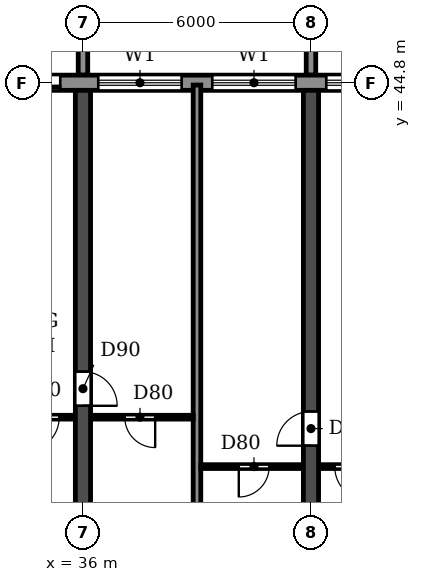
"""IFC4 building model, lengths in metres.
Left out: names, types, materials, properties, quantities, classifications, styles, units other than length and angle.
Written with IfcOpenShell. Run it as: python <this file> out.ifc"""

import sys

from ifc_helpers import new_model, si_unit, direction, frame, frame_2d, origin, place, context, subcontext, project, spatial, polyline, rectangle, outline, extrude, source, transform, mapped, element, fill, save


model = new_model("IFC4")
c1 = context("Model", 3, precision=1e-05, world=origin(), true_north=direction((0.0, 1.0)))
c2 = subcontext(c1, "Body", "Model", "MODEL_VIEW")
j1 = project(units=[si_unit("LENGTHUNIT", "METRE"), si_unit("PLANEANGLEUNIT", "RADIAN")], contexts=[c1])
p1 = place(None, origin())
s1 = spatial("IfcSite", under=j1, at=p1, CompositionType="ELEMENT")
p2 = place(p1, origin())
s2 = spatial("IfcBuilding", under=s1, at=p2, CompositionType="ELEMENT")
p3 = place(p2, frame((0.0, 0.0, 43.2)))
s3 = spatial("IfcBuildingStorey", under=s2, at=p3, CompositionType="ELEMENT", Elevation=43.2)
p4 = place(p3, frame((36.0, 30.55, 0.0), z_axis=(0.0, 0.0, 1.0), x_axis=(0.0, 1.0, 0.0)))
e1 = element("IfcWall", 1, at=p4, inside=s3, PredefinedType="SHEAR", context=c2, shape_type="SweptSolid", body=[
    extrude(rectangle(XDim=14.05, YDim=0.4, at=frame_2d((7.025, 0.0))), origin(), (0.0, 0.0, 1.0), 3.05),
])
p5 = place(p4, frame((5.75, 0.0, 0.0)))
e2 = element("IfcOpeningElement", 2, at=p5, cuts=e1, PredefinedType="OPENING", context=c2, shape_type="SweptSolid", body=[
    extrude(rectangle(XDim=0.9, YDim=2.1, at=frame_2d((0.45, 1.05))), frame((0.0, 0.21, 0.0), z_axis=(0.0, -1.0, 0.0), x_axis=(1.0, 0.0, 0.0)), (0.0, 0.0, 1.0), 0.42),
])
p6 = place(p3, frame((42.0, 30.55, 0.0), z_axis=(0.0, 0.0, 1.0), x_axis=(0.0, 1.0, 0.0)))
e3 = element("IfcWall", 3, at=p6, inside=s3, PredefinedType="SHEAR", context=c2, shape_type="SweptSolid", body=[
    extrude(rectangle(XDim=14.05, YDim=0.4, at=frame_2d((7.025, 0.0))), origin(), (0.0, 0.0, 1.0), 3.05),
])
p7 = place(p6, frame((4.7, 0.0, 0.0)))
e4 = element("IfcOpeningElement", 4, at=p7, cuts=e3, PredefinedType="OPENING", context=c2, shape_type="SweptSolid", body=[
    extrude(rectangle(XDim=0.9, YDim=2.1, at=frame_2d((0.45, 1.05))), frame((0.0, 0.21, 0.0), z_axis=(0.0, -1.0, 0.0), x_axis=(1.0, 0.0, 0.0)), (0.0, 0.0, 1.0), 0.42),
])
p8 = place(p3, frame((97.317, 44.8, 0.0), z_axis=(0.0, 0.0, 1.0), x_axis=(-1.0, 0.0, 0.0)))
e5 = element("IfcWall", 5, at=p8, inside=s3, PredefinedType="STANDARD", context=c2, shape_type="SweptSolid", body=[
    extrude(rectangle(XDim=92.634, YDim=0.4, at=frame_2d((46.317, 0.0))), origin(), (0.0, 0.0, 1.0), 3.05),
])
p9 = place(p8, frame((88.917, 0.0, 0.0)))
e6 = element("IfcOpeningElement", 6, at=p9, cuts=e5, PredefinedType="OPENING", context=c2, shape_type="SweptSolid", body=[
    extrude(rectangle(XDim=1.8, YDim=2.4, at=frame_2d((0.9, 1.2))), frame((0.0, 0.21, 0.0), z_axis=(0.0, -1.0, 0.0), x_axis=(1.0, 0.0, 0.0)), (0.0, 0.0, 1.0), 0.42),
])
p10 = place(p8, frame((85.717, 0.0, 0.9)))
e7 = element("IfcOpeningElement", 7, at=p10, cuts=e5, PredefinedType="OPENING", context=c2, shape_type="SweptSolid", body=[
    extrude(rectangle(XDim=2.2, YDim=1.5, at=frame_2d((1.1, 0.75))), frame((0.0, 0.21, 0.0), z_axis=(0.0, -1.0, 0.0), x_axis=(1.0, 0.0, 0.0)), (0.0, 0.0, 1.0), 0.42),
])
p11 = place(p8, frame((82.717, 0.0, 0.9)))
e8 = element("IfcOpeningElement", 8, at=p11, cuts=e5, PredefinedType="OPENING", context=c2, shape_type="SweptSolid", body=[
    extrude(rectangle(XDim=2.2, YDim=1.5, at=frame_2d((1.1, 0.75))), frame((0.0, 0.21, 0.0), z_axis=(0.0, -1.0, 0.0), x_axis=(1.0, 0.0, 0.0)), (0.0, 0.0, 1.0), 0.42),
])
p12 = place(p8, frame((79.717, 0.0, 0.9)))
e9 = element("IfcOpeningElement", 9, at=p12, cuts=e5, PredefinedType="OPENING", context=c2, shape_type="SweptSolid", body=[
    extrude(rectangle(XDim=2.2, YDim=1.5, at=frame_2d((1.1, 0.75))), frame((0.0, 0.21, 0.0), z_axis=(0.0, -1.0, 0.0), x_axis=(1.0, 0.0, 0.0)), (0.0, 0.0, 1.0), 0.42),
])
p13 = place(p8, frame((76.717, 0.0, 0.9)))
e10 = element("IfcOpeningElement", 10, at=p13, cuts=e5, PredefinedType="OPENING", context=c2, shape_type="SweptSolid", body=[
    extrude(rectangle(XDim=2.2, YDim=1.5, at=frame_2d((1.1, 0.75))), frame((0.0, 0.21, 0.0), z_axis=(0.0, -1.0, 0.0), x_axis=(1.0, 0.0, 0.0)), (0.0, 0.0, 1.0), 0.42),
])
p14 = place(p8, frame((73.917, 0.0, 0.0)))
e11 = element("IfcOpeningElement", 11, at=p14, cuts=e5, PredefinedType="OPENING", context=c2, shape_type="SweptSolid", body=[
    extrude(rectangle(XDim=1.8, YDim=2.4, at=frame_2d((0.9, 1.2))), frame((0.0, 0.21, 0.0), z_axis=(0.0, -1.0, 0.0), x_axis=(1.0, 0.0, 0.0)), (0.0, 0.0, 1.0), 0.42),
])
p15 = place(p8, frame((70.717, 0.0, 0.9)))
e12 = element("IfcOpeningElement", 12, at=p15, cuts=e5, PredefinedType="OPENING", context=c2, shape_type="SweptSolid", body=[
    extrude(rectangle(XDim=2.2, YDim=1.5, at=frame_2d((1.1, 0.75))), frame((0.0, 0.21, 0.0), z_axis=(0.0, -1.0, 0.0), x_axis=(1.0, 0.0, 0.0)), (0.0, 0.0, 1.0), 0.42),
])
p16 = place(p8, frame((67.717, 0.0, 0.9)))
e13 = element("IfcOpeningElement", 13, at=p16, cuts=e5, PredefinedType="OPENING", context=c2, shape_type="SweptSolid", body=[
    extrude(rectangle(XDim=2.2, YDim=1.5, at=frame_2d((1.1, 0.75))), frame((0.0, 0.21, 0.0), z_axis=(0.0, -1.0, 0.0), x_axis=(1.0, 0.0, 0.0)), (0.0, 0.0, 1.0), 0.42),
])
p17 = place(p8, frame((64.717, 0.0, 0.9)))
e14 = element("IfcOpeningElement", 14, at=p17, cuts=e5, PredefinedType="OPENING", context=c2, shape_type="SweptSolid", body=[
    extrude(rectangle(XDim=2.2, YDim=1.5, at=frame_2d((1.1, 0.75))), frame((0.0, 0.21, 0.0), z_axis=(0.0, -1.0, 0.0), x_axis=(1.0, 0.0, 0.0)), (0.0, 0.0, 1.0), 0.42),
])
p18 = place(p8, frame((61.917, 0.0, 0.0)))
e15 = element("IfcOpeningElement", 15, at=p18, cuts=e5, PredefinedType="OPENING", context=c2, shape_type="SweptSolid", body=[
    extrude(rectangle(XDim=1.8, YDim=2.4, at=frame_2d((0.9, 1.2))), frame((0.0, 0.21, 0.0), z_axis=(0.0, -1.0, 0.0), x_axis=(1.0, 0.0, 0.0)), (0.0, 0.0, 1.0), 0.42),
])
p19 = place(p8, frame((58.717, 0.0, 0.9)))
e16 = element("IfcOpeningElement", 16, at=p19, cuts=e5, PredefinedType="OPENING", context=c2, shape_type="SweptSolid", body=[
    extrude(rectangle(XDim=2.2, YDim=1.5, at=frame_2d((1.1, 0.75))), frame((0.0, 0.21, 0.0), z_axis=(0.0, -1.0, 0.0), x_axis=(1.0, 0.0, 0.0)), (0.0, 0.0, 1.0), 0.42),
])
p20 = place(p8, frame((55.717, 0.0, 0.9)))
e17 = element("IfcOpeningElement", 17, at=p20, cuts=e5, PredefinedType="OPENING", context=c2, shape_type="SweptSolid", body=[
    extrude(rectangle(XDim=2.2, YDim=1.5, at=frame_2d((1.1, 0.75))), frame((0.0, 0.21, 0.0), z_axis=(0.0, -1.0, 0.0), x_axis=(1.0, 0.0, 0.0)), (0.0, 0.0, 1.0), 0.42),
])
p21 = place(p8, frame((52.717, 0.0, 0.9)))
e18 = element("IfcOpeningElement", 18, at=p21, cuts=e5, PredefinedType="OPENING", context=c2, shape_type="SweptSolid", body=[
    extrude(rectangle(XDim=2.2, YDim=1.5, at=frame_2d((1.1, 0.75))), frame((0.0, 0.21, 0.0), z_axis=(0.0, -1.0, 0.0), x_axis=(1.0, 0.0, 0.0)), (0.0, 0.0, 1.0), 0.42),
])
p22 = place(p8, frame((49.917, 0.0, 0.0)))
e19 = element("IfcOpeningElement", 19, at=p22, cuts=e5, PredefinedType="OPENING", context=c2, shape_type="SweptSolid", body=[
    extrude(rectangle(XDim=1.8, YDim=2.4, at=frame_2d((0.9, 1.2))), frame((0.0, 0.21, 0.0), z_axis=(0.0, -1.0, 0.0), x_axis=(1.0, 0.0, 0.0)), (0.0, 0.0, 1.0), 0.42),
])
p23 = place(p8, frame((46.717, 0.0, 0.9)))
e20 = element("IfcOpeningElement", 20, at=p23, cuts=e5, PredefinedType="OPENING", context=c2, shape_type="SweptSolid", body=[
    extrude(rectangle(XDim=2.2, YDim=1.5, at=frame_2d((1.1, 0.75))), frame((0.0, 0.21, 0.0), z_axis=(0.0, -1.0, 0.0), x_axis=(1.0, 0.0, 0.0)), (0.0, 0.0, 1.0), 0.42),
])
p24 = place(p8, frame((43.717, 0.0, 0.9)))
e21 = element("IfcOpeningElement", 21, at=p24, cuts=e5, PredefinedType="OPENING", context=c2, shape_type="SweptSolid", body=[
    extrude(rectangle(XDim=2.2, YDim=1.5, at=frame_2d((1.1, 0.75))), frame((0.0, 0.21, 0.0), z_axis=(0.0, -1.0, 0.0), x_axis=(1.0, 0.0, 0.0)), (0.0, 0.0, 1.0), 0.42),
])
p25 = place(p8, frame((40.717, 0.0, 0.9)))
e22 = element("IfcOpeningElement", 22, at=p25, cuts=e5, PredefinedType="OPENING", context=c2, shape_type="SweptSolid", body=[
    extrude(rectangle(XDim=2.2, YDim=1.5, at=frame_2d((1.1, 0.75))), frame((0.0, 0.21, 0.0), z_axis=(0.0, -1.0, 0.0), x_axis=(1.0, 0.0, 0.0)), (0.0, 0.0, 1.0), 0.42),
])
p26 = place(p8, frame((37.917, 0.0, 0.0)))
e23 = element("IfcOpeningElement", 23, at=p26, cuts=e5, PredefinedType="OPENING", context=c2, shape_type="SweptSolid", body=[
    extrude(rectangle(XDim=1.8, YDim=2.4, at=frame_2d((0.9, 1.2))), frame((0.0, 0.21, 0.0), z_axis=(0.0, -1.0, 0.0), x_axis=(1.0, 0.0, 0.0)), (0.0, 0.0, 1.0), 0.42),
])
p27 = place(p8, frame((34.717, 0.0, 0.9)))
e24 = element("IfcOpeningElement", 24, at=p27, cuts=e5, PredefinedType="OPENING", context=c2, shape_type="SweptSolid", body=[
    extrude(rectangle(XDim=2.2, YDim=1.5, at=frame_2d((1.1, 0.75))), frame((0.0, 0.21, 0.0), z_axis=(0.0, -1.0, 0.0), x_axis=(1.0, 0.0, 0.0)), (0.0, 0.0, 1.0), 0.42),
])
p28 = place(p8, frame((31.717, 0.0, 0.9)))
e25 = element("IfcOpeningElement", 25, at=p28, cuts=e5, PredefinedType="OPENING", context=c2, shape_type="SweptSolid", body=[
    extrude(rectangle(XDim=2.2, YDim=1.5, at=frame_2d((1.1, 0.75))), frame((0.0, 0.21, 0.0), z_axis=(0.0, -1.0, 0.0), x_axis=(1.0, 0.0, 0.0)), (0.0, 0.0, 1.0), 0.42),
])
p29 = place(p8, frame((28.717, 0.0, 0.9)))
e26 = element("IfcOpeningElement", 26, at=p29, cuts=e5, PredefinedType="OPENING", context=c2, shape_type="SweptSolid", body=[
    extrude(rectangle(XDim=2.2, YDim=1.5, at=frame_2d((1.1, 0.75))), frame((0.0, 0.21, 0.0), z_axis=(0.0, -1.0, 0.0), x_axis=(1.0, 0.0, 0.0)), (0.0, 0.0, 1.0), 0.42),
])
p30 = place(p8, frame((25.917, 0.0, 0.0)))
e27 = element("IfcOpeningElement", 27, at=p30, cuts=e5, PredefinedType="OPENING", context=c2, shape_type="SweptSolid", body=[
    extrude(rectangle(XDim=1.8, YDim=2.4, at=frame_2d((0.9, 1.2))), frame((0.0, 0.21, 0.0), z_axis=(0.0, -1.0, 0.0), x_axis=(1.0, 0.0, 0.0)), (0.0, 0.0, 1.0), 0.42),
])
p31 = place(p8, frame((22.917, 0.0, 0.0)))
e28 = element("IfcOpeningElement", 28, at=p31, cuts=e5, PredefinedType="OPENING", context=c2, shape_type="SweptSolid", body=[
    extrude(rectangle(XDim=1.8, YDim=2.4, at=frame_2d((0.9, 1.2))), frame((0.0, 0.21, 0.0), z_axis=(0.0, -1.0, 0.0), x_axis=(1.0, 0.0, 0.0)), (0.0, 0.0, 1.0), 0.42),
])
p32 = place(p8, frame((19.717, 0.0, 0.9)))
e29 = element("IfcOpeningElement", 29, at=p32, cuts=e5, PredefinedType="OPENING", context=c2, shape_type="SweptSolid", body=[
    extrude(rectangle(XDim=2.2, YDim=1.5, at=frame_2d((1.1, 0.75))), frame((0.0, 0.21, 0.0), z_axis=(0.0, -1.0, 0.0), x_axis=(1.0, 0.0, 0.0)), (0.0, 0.0, 1.0), 0.42),
])
p33 = place(p8, frame((16.717, 0.0, 0.9)))
e30 = element("IfcOpeningElement", 30, at=p33, cuts=e5, PredefinedType="OPENING", context=c2, shape_type="SweptSolid", body=[
    extrude(rectangle(XDim=2.2, YDim=1.5, at=frame_2d((1.1, 0.75))), frame((0.0, 0.21, 0.0), z_axis=(0.0, -1.0, 0.0), x_axis=(1.0, 0.0, 0.0)), (0.0, 0.0, 1.0), 0.42),
])
p34 = place(p8, frame((13.717, 0.0, 0.9)))
e31 = element("IfcOpeningElement", 31, at=p34, cuts=e5, PredefinedType="OPENING", context=c2, shape_type="SweptSolid", body=[
    extrude(rectangle(XDim=2.2, YDim=1.5, at=frame_2d((1.1, 0.75))), frame((0.0, 0.21, 0.0), z_axis=(0.0, -1.0, 0.0), x_axis=(1.0, 0.0, 0.0)), (0.0, 0.0, 1.0), 0.42),
])
p35 = place(p8, frame((10.717, 0.0, 0.9)))
e32 = element("IfcOpeningElement", 32, at=p35, cuts=e5, PredefinedType="OPENING", context=c2, shape_type="SweptSolid", body=[
    extrude(rectangle(XDim=2.2, YDim=1.5, at=frame_2d((1.1, 0.75))), frame((0.0, 0.21, 0.0), z_axis=(0.0, -1.0, 0.0), x_axis=(1.0, 0.0, 0.0)), (0.0, 0.0, 1.0), 0.42),
])
p36 = place(p8, frame((7.917, 0.0, 0.0)))
e33 = element("IfcOpeningElement", 33, at=p36, cuts=e5, PredefinedType="OPENING", context=c2, shape_type="SweptSolid", body=[
    extrude(rectangle(XDim=1.8, YDim=2.4, at=frame_2d((0.9, 1.2))), frame((0.0, 0.21, 0.0), z_axis=(0.0, -1.0, 0.0), x_axis=(1.0, 0.0, 0.0)), (0.0, 0.0, 1.0), 0.42),
])
p37 = place(p8, frame((4.717, 0.0, 0.9)))
e34 = element("IfcOpeningElement", 34, at=p37, cuts=e5, PredefinedType="OPENING", context=c2, shape_type="SweptSolid", body=[
    extrude(rectangle(XDim=2.2, YDim=1.5, at=frame_2d((1.1, 0.75))), frame((0.0, 0.21, 0.0), z_axis=(0.0, -1.0, 0.0), x_axis=(1.0, 0.0, 0.0)), (0.0, 0.0, 1.0), 0.42),
])
p38 = place(p8, frame((1.917, 0.0, 0.0)))
e35 = element("IfcOpeningElement", 35, at=p38, cuts=e5, PredefinedType="OPENING", context=c2, shape_type="SweptSolid", body=[
    extrude(rectangle(XDim=1.8, YDim=2.4, at=frame_2d((0.9, 1.2))), frame((0.0, 0.21, 0.0), z_axis=(0.0, -1.0, 0.0), x_axis=(1.0, 0.0, 0.0)), (0.0, 0.0, 1.0), 0.42),
])
m1 = source(origin(), c2, "Body", "SweptSolid", [
    extrude(outline(polyline([(0.0, 0.0), (0.25, 0.0), (0.25, 3.1), (0.0, 3.1), (0.0, 0.0)])), origin(), (0.0, 0.0, 1.0), 3.1),
])
for number, where in (
    (36, (35.875, 45.0, 0.0)),
    (37, (41.875, 45.0, 0.0)),
):
    element("IfcWall", number, at=place(p3, frame(where)), inside=s3, PredefinedType="STANDARD", context=c2, shape_type="MappedRepresentation", body=[
        mapped(m1, transform((0.0, 0.0, 0.0))),
    ])
p39 = place(p3, frame((39.0, 30.56, 0.0), z_axis=(0.0, 0.0, 1.0), x_axis=(0.0, 1.0, 0.0)))
e38 = element("IfcWall", 38, at=p39, inside=s3, PredefinedType="PARTITIONING", context=c2, shape_type="SweptSolid", body=[
    extrude(rectangle(XDim=14.18, YDim=0.2, at=frame_2d((7.09, 0.0))), origin(), (0.0, 0.0, 1.0), 3.05),
])
p40 = place(p3, frame((39.1, 34.7, 0.0), z_axis=(0.0, 0.0, 1.0), x_axis=(1.0, 0.0, 0.0)))
e39 = element("IfcWall", 39, at=p40, inside=s3, PredefinedType="PARTITIONING", context=c2, shape_type="SweptSolid", body=[
    extrude(rectangle(XDim=2.69, YDim=0.1, at=frame_2d((1.345, 0.0))), origin(), (0.0, 0.0, 1.0), 3.05),
])
p41 = place(p40, frame((1.0, 0.0, 0.0)))
e40 = element("IfcOpeningElement", 40, at=p41, cuts=e39, PredefinedType="OPENING", context=c2, shape_type="SweptSolid", body=[
    extrude(rectangle(XDim=0.8, YDim=2.1, at=frame_2d((0.4, 1.05))), frame((0.0, 0.06, 0.0), z_axis=(0.0, -1.0, 0.0), x_axis=(1.0, 0.0, 0.0)), (0.0, 0.0, 1.0), 0.12),
])
p42 = place(p3, frame((42.21, 34.7, 0.0), z_axis=(0.0, 0.0, 1.0), x_axis=(1.0, 0.0, 0.0)))
e41 = element("IfcWall", 41, at=p42, inside=s3, PredefinedType="PARTITIONING", context=c2, shape_type="SweptSolid", body=[
    extrude(rectangle(XDim=1.99, YDim=0.1, at=frame_2d((0.995, 0.0))), origin(), (0.0, 0.0, 1.0), 3.05),
])
p43 = place(p42, frame((0.415, 0.0, 0.0)))
e42 = element("IfcOpeningElement", 42, at=p43, cuts=e41, PredefinedType="OPENING", context=c2, shape_type="SweptSolid", body=[
    extrude(rectangle(XDim=0.9, YDim=2.1, at=frame_2d((0.45, 1.05))), frame((0.0, 0.06, 0.0), z_axis=(0.0, -1.0, 0.0), x_axis=(1.0, 0.0, 0.0)), (0.0, 0.0, 1.0), 0.12),
])
p44 = place(p3, frame((33.8, 36.0, 0.0), z_axis=(0.0, 0.0, 1.0), x_axis=(1.0, 0.0, 0.0)))
e43 = element("IfcWall", 43, at=p44, inside=s3, PredefinedType="PARTITIONING", context=c2, shape_type="SweptSolid", body=[
    extrude(rectangle(XDim=1.99, YDim=0.1, at=frame_2d((0.995, 0.0))), origin(), (0.0, 0.0, 1.0), 3.05),
])
p45 = place(p44, frame((0.675, 0.0, 0.0)))
e44 = element("IfcOpeningElement", 44, at=p45, cuts=e43, PredefinedType="OPENING", context=c2, shape_type="SweptSolid", body=[
    extrude(rectangle(XDim=0.9, YDim=2.1, at=frame_2d((0.45, 1.05))), frame((0.0, 0.06, 0.0), z_axis=(0.0, -1.0, 0.0), x_axis=(1.0, 0.0, 0.0)), (0.0, 0.0, 1.0), 0.12),
])
p46 = place(p3, frame((36.21, 36.0, 0.0), z_axis=(0.0, 0.0, 1.0), x_axis=(1.0, 0.0, 0.0)))
e45 = element("IfcWall", 45, at=p46, inside=s3, PredefinedType="PARTITIONING", context=c2, shape_type="SweptSolid", body=[
    extrude(rectangle(XDim=2.69, YDim=0.1, at=frame_2d((1.345, 0.0))), origin(), (0.0, 0.0, 1.0), 3.05),
])
p47 = place(p46, frame((0.89, 0.0, 0.0)))
e46 = element("IfcOpeningElement", 46, at=p47, cuts=e45, PredefinedType="OPENING", context=c2, shape_type="SweptSolid", body=[
    extrude(rectangle(XDim=0.8, YDim=2.1, at=frame_2d((0.4, 1.05))), frame((0.0, 0.06, 0.0), z_axis=(0.0, -1.0, 0.0), x_axis=(1.0, 0.0, 0.0)), (0.0, 0.0, 1.0), 0.12),
])
p48 = place(p18, origin())
e47 = element("IfcDoor", 47, at=p48, inside=s3, OperationType="DOUBLE_DOOR_SLIDING", PredefinedType="DOOR", context=c2, shape_type="SweptSolid", body=[
    extrude(rectangle(XDim=1.8, YDim=2.4, at=frame_2d((0.9, 1.2))), frame((0.0, 0.025, 0.0), z_axis=(0.0, -1.0, 0.0), x_axis=(1.0, 0.0, 0.0)), (0.0, 0.0, 1.0), 0.05),
])
fill(e15, e47)
p49 = place(p19, origin())
e48 = element("IfcWindow", 48, at=p49, inside=s3, PartitioningType="DOUBLE_PANEL_HORIZONTAL", PredefinedType="WINDOW", context=c2, shape_type="SweptSolid", body=[
    extrude(rectangle(XDim=2.2, YDim=1.5, at=frame_2d((1.1, 0.75))), frame((0.0, 0.03, 0.0), z_axis=(0.0, -1.0, 0.0), x_axis=(1.0, 0.0, 0.0)), (0.0, 0.0, 1.0), 0.06),
])
fill(e16, e48)
p50 = place(p20, origin())
e49 = element("IfcWindow", 49, at=p50, inside=s3, PartitioningType="DOUBLE_PANEL_HORIZONTAL", PredefinedType="WINDOW", context=c2, shape_type="SweptSolid", body=[
    extrude(rectangle(XDim=2.2, YDim=1.5, at=frame_2d((1.1, 0.75))), frame((0.0, 0.03, 0.0), z_axis=(0.0, -1.0, 0.0), x_axis=(1.0, 0.0, 0.0)), (0.0, 0.0, 1.0), 0.06),
])
fill(e17, e49)
p51 = place(p21, origin())
e50 = element("IfcWindow", 50, at=p51, inside=s3, PartitioningType="DOUBLE_PANEL_HORIZONTAL", PredefinedType="WINDOW", context=c2, shape_type="SweptSolid", body=[
    extrude(rectangle(XDim=2.2, YDim=1.5, at=frame_2d((1.1, 0.75))), frame((0.0, 0.03, 0.0), z_axis=(0.0, -1.0, 0.0), x_axis=(1.0, 0.0, 0.0)), (0.0, 0.0, 1.0), 0.06),
])
fill(e18, e50)
p52 = place(p47, frame((0.8, 0.0, 0.0), z_axis=(0.0, 0.0, 1.0), x_axis=(-1.0, 0.0, 0.0)))
e51 = element("IfcDoor", 51, at=p52, inside=s3, OperationType="SINGLE_SWING_LEFT", PredefinedType="DOOR", context=c2, shape_type="SweptSolid", body=[
    extrude(rectangle(XDim=0.8, YDim=2.1, at=frame_2d((0.4, 1.05))), frame((0.0, 0.025, 0.0), z_axis=(0.0, -1.0, 0.0), x_axis=(1.0, 0.0, 0.0)), (0.0, 0.0, 1.0), 0.05),
])
fill(e46, e51)
p53 = place(p45, frame((0.9, 0.0, 0.0), z_axis=(0.0, 0.0, 1.0), x_axis=(-1.0, 0.0, 0.0)))
e52 = element("IfcDoor", 52, at=p53, inside=s3, OperationType="SINGLE_SWING_RIGHT", PredefinedType="DOOR", context=c2, shape_type="SweptSolid", body=[
    extrude(rectangle(XDim=0.9, YDim=2.1, at=frame_2d((0.45, 1.05))), frame((0.0, 0.025, 0.0), z_axis=(0.0, -1.0, 0.0), x_axis=(1.0, 0.0, 0.0)), (0.0, 0.0, 1.0), 0.05),
])
fill(e44, e52)
p54 = place(p5, frame((0.9, 0.0, 0.0), z_axis=(0.0, 0.0, 1.0), x_axis=(-1.0, 0.0, 0.0)))
e53 = element("IfcDoor", 53, at=p54, inside=s3, OperationType="SINGLE_SWING_RIGHT", PredefinedType="DOOR", context=c2, shape_type="SweptSolid", body=[
    extrude(rectangle(XDim=0.9, YDim=2.1, at=frame_2d((0.45, 1.05))), frame((0.0, 0.025, 0.0), z_axis=(0.0, -1.0, 0.0), x_axis=(1.0, 0.0, 0.0)), (0.0, 0.0, 1.0), 0.05),
])
fill(e2, e53)
p55 = place(p41, frame((0.8, 0.0, 0.0), z_axis=(0.0, 0.0, 1.0), x_axis=(-1.0, 0.0, 0.0)))
e54 = element("IfcDoor", 54, at=p55, inside=s3, OperationType="SINGLE_SWING_RIGHT", PredefinedType="DOOR", context=c2, shape_type="SweptSolid", body=[
    extrude(rectangle(XDim=0.8, YDim=2.1, at=frame_2d((0.4, 1.05))), frame((0.0, 0.025, 0.0), z_axis=(0.0, -1.0, 0.0), x_axis=(1.0, 0.0, 0.0)), (0.0, 0.0, 1.0), 0.05),
])
fill(e40, e54)
p56 = place(p7, origin())
e55 = element("IfcDoor", 55, at=p56, inside=s3, OperationType="SINGLE_SWING_LEFT", PredefinedType="DOOR", context=c2, shape_type="SweptSolid", body=[
    extrude(rectangle(XDim=0.9, YDim=2.1, at=frame_2d((0.45, 1.05))), frame((0.0, 0.025, 0.0), z_axis=(0.0, -1.0, 0.0), x_axis=(1.0, 0.0, 0.0)), (0.0, 0.0, 1.0), 0.05),
])
fill(e4, e55)
p57 = place(p43, frame((0.9, 0.0, 0.0), z_axis=(0.0, 0.0, 1.0), x_axis=(-1.0, 0.0, 0.0)))
e56 = element("IfcDoor", 56, at=p57, inside=s3, OperationType="SINGLE_SWING_LEFT", PredefinedType="DOOR", context=c2, shape_type="SweptSolid", body=[
    extrude(rectangle(XDim=0.9, YDim=2.1, at=frame_2d((0.45, 1.05))), frame((0.0, 0.025, 0.0), z_axis=(0.0, -1.0, 0.0), x_axis=(1.0, 0.0, 0.0)), (0.0, 0.0, 1.0), 0.05),
])
fill(e42, e56)
save(model, sys.argv[1])
